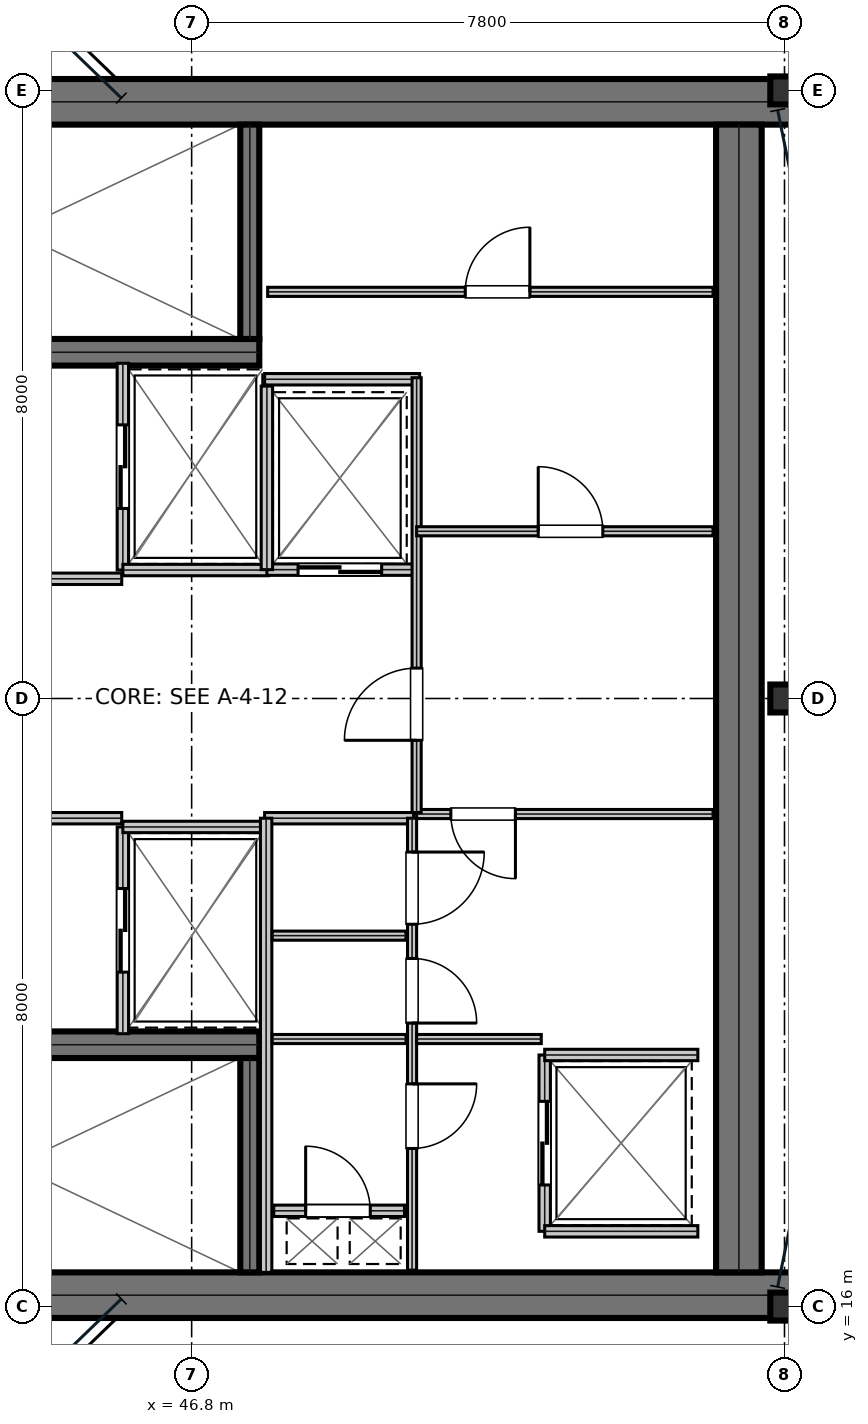
"""IFC4 building model, lengths in metres.
Left out: names, types, materials, properties, quantities, classifications, styles, units other than length and angle.
Written with IfcOpenShell. Run it as: python <this file> out.ifc"""

import sys

from ifc_helpers import new_model, si_unit, direction, frame, frame_2d, origin, origin_2d, place, context, subcontext, project, spatial, rectangle, i_section, extrude, element, fill, save


model = new_model("IFC4")
c1 = context("Model", 3, precision=1e-05, world=origin(), true_north=direction((0.0, 1.0)))
c2 = subcontext(c1, "Body", "Model", "MODEL_VIEW")
j1 = project(units=[si_unit("LENGTHUNIT", "METRE"), si_unit("PLANEANGLEUNIT", "RADIAN")], contexts=[c1])
p1 = place(None, origin())
s1 = spatial("IfcSite", under=j1, at=p1, CompositionType="ELEMENT")
p2 = place(p1, origin())
s2 = spatial("IfcBuilding", under=s1, at=p2, CompositionType="ELEMENT")
p3 = place(p2, frame((0.0, 0.0, 319.5)))
s3 = spatial("IfcBuildingStorey", under=s2, at=p3, CompositionType="ELEMENT", Elevation=319.5)
for number, where, z_axis, x_axis in (
    (1, (38.8, 31.85, 0.0), (0.0, 0.0, 1.0), (1.0, 0.0, 0.0)),
    (2, (38.8, 16.15, 0.0), (0.0, 0.0, 1.0), (1.0, 0.0, 0.0)),
):
    element("IfcWall", number, at=place(p3, frame(where, z_axis=z_axis, x_axis=x_axis)), inside=s3, PredefinedType="SHEAR", context=c2, shape_type="SweptSolid", body=[
        extrude(rectangle(XDim=16.0, YDim=0.6, at=frame_2d((8.0, 0.0))), origin(), (0.0, 0.0, 1.0), 3.81),
    ])
p4 = place(p3, frame((54.0, 16.45, 0.0), z_axis=(0.0, 0.0, 1.0), x_axis=(0.0, 1.0, 0.0)))
e3 = element("IfcWall", 3, at=p4, inside=s3, PredefinedType="SHEAR", context=c2, shape_type="SweptSolid", body=[
    extrude(rectangle(XDim=15.1, YDim=0.6, at=frame_2d((7.55, 0.0))), origin(), (0.0, 0.0, 1.0), 3.81),
])
p5 = place(p3, frame((39.98, 28.555, 0.0), z_axis=(0.0, 0.0, 1.0), x_axis=(1.0, 0.0, 0.0)))
e4 = element("IfcWall", 4, at=p5, inside=s3, PredefinedType="SHEAR", context=c2, shape_type="SweptSolid", body=[
    extrude(rectangle(XDim=7.71, YDim=0.35, at=frame_2d((3.855, 0.0))), origin(), (0.0, 0.0, 1.0), 3.81),
])
p6 = place(p5, frame((0.25, 0.0, 0.0)))
e5 = element("IfcOpeningElement", 5, at=p6, cuts=e4, PredefinedType="OPENING", context=c2, shape_type="SweptSolid", body=[
    extrude(rectangle(XDim=1.1, YDim=2.15, at=frame_2d((0.55, 1.075))), frame((0.0, 0.185, 0.0), z_axis=(0.0, -1.0, 0.0), x_axis=(1.0, 0.0, 0.0)), (0.0, 0.0, 1.0), 0.37),
])
p7 = place(p3, frame((39.98, 19.445, 0.0), z_axis=(0.0, 0.0, 1.0), x_axis=(1.0, 0.0, 0.0)))
e6 = element("IfcWall", 6, at=p7, inside=s3, PredefinedType="SHEAR", context=c2, shape_type="SweptSolid", body=[
    extrude(rectangle(XDim=7.71, YDim=0.35, at=frame_2d((3.855, 0.0))), origin(), (0.0, 0.0, 1.0), 3.81),
])
p8 = place(p7, frame((0.25, 0.0, 0.0)))
e7 = element("IfcOpeningElement", 7, at=p8, cuts=e6, PredefinedType="OPENING", context=c2, shape_type="SweptSolid", body=[
    extrude(rectangle(XDim=1.1, YDim=2.15, at=frame_2d((0.55, 1.075))), frame((0.0, 0.185, 0.0), z_axis=(0.0, -1.0, 0.0), x_axis=(1.0, 0.0, 0.0)), (0.0, 0.0, 1.0), 0.37),
])
for number, where, z_axis, x_axis in (
    (8, (47.565, 28.73, 0.0), (0.0, 0.0, 1.0), (0.0, 1.0, 0.0)),
    (9, (47.565, 16.45, 0.0), (0.0, 0.0, 1.0), (0.0, 1.0, 0.0)),
):
    element("IfcWall", number, at=place(p3, frame(where, z_axis=z_axis, x_axis=x_axis)), inside=s3, PredefinedType="SHEAR", context=c2, shape_type="SweptSolid", body=[
        extrude(rectangle(XDim=2.82, YDim=0.25, at=frame_2d((1.41, 0.0))), origin(), (0.0, 0.0, 1.0), 3.81),
    ])
for number, where, z_axis, x_axis in (
    (10, (54.6, 16.0, 0.0), (0.0, 0.0, 1.0), (1.0, 0.0, 0.0)),
    (11, (54.6, 24.0, 0.0), (0.0, 0.0, 1.0), (1.0, 0.0, 0.0)),
    (12, (54.6, 32.0, 0.0), (0.0, 0.0, 1.0), (1.0, 0.0, 0.0)),
):
    element("IfcColumn", number, at=place(p3, frame(where, z_axis=z_axis, x_axis=x_axis)), inside=s3, PredefinedType="COLUMN", context=c2, shape_type="SweptSolid", body=[
        extrude(i_section(OverallWidth=0.373, OverallDepth=0.368, WebThickness=0.015, FlangeThickness=0.024, at=origin_2d()), origin(), (0.0, 0.0, 1.0), 4.044),
    ])
p9 = place(p3, frame((39.98, 25.575, 0.0), z_axis=(0.0, 0.0, 1.0), x_axis=(1.0, 0.0, 0.0)))
e13 = element("IfcWall", 13, at=p9, inside=s3, PredefinedType="PARTITIONING", context=c2, shape_type="SweptSolid", body=[
    extrude(rectangle(XDim=5.9, YDim=0.15, at=frame_2d((2.95, 0.0))), origin(), (0.0, 0.0, 1.0), 3.81),
])
p10 = place(p9, frame((2.35, 0.0, 0.0)))
e14 = element("IfcOpeningElement", 14, at=p10, cuts=e13, PredefinedType="OPENING", context=c2, shape_type="SweptSolid", body=[
    extrude(rectangle(XDim=1.05, YDim=2.15, at=frame_2d((0.525, 1.075))), frame((0.0, 0.085, 0.0), z_axis=(0.0, -1.0, 0.0), x_axis=(1.0, 0.0, 0.0)), (0.0, 0.0, 1.0), 0.17),
])
p11 = place(p3, frame((39.98, 22.425, 0.0), z_axis=(0.0, 0.0, 1.0), x_axis=(1.0, 0.0, 0.0)))
e15 = element("IfcWall", 15, at=p11, inside=s3, PredefinedType="PARTITIONING", context=c2, shape_type="SweptSolid", body=[
    extrude(rectangle(XDim=5.9, YDim=0.15, at=frame_2d((2.95, 0.0))), origin(), (0.0, 0.0, 1.0), 3.81),
])
p12 = place(p11, frame((2.35, 0.0, 0.0)))
e16 = element("IfcOpeningElement", 16, at=p12, cuts=e15, PredefinedType="OPENING", context=c2, shape_type="SweptSolid", body=[
    extrude(rectangle(XDim=1.05, YDim=2.15, at=frame_2d((0.525, 1.075))), frame((0.0, 0.085, 0.0), z_axis=(0.0, -1.0, 0.0), x_axis=(1.0, 0.0, 0.0)), (0.0, 0.0, 1.0), 0.17),
])
p13 = place(p3, frame((45.895, 25.69, 0.0), z_axis=(0.0, 0.0, 1.0), x_axis=(0.0, 1.0, 0.0)))
e17 = element("IfcWall", 17, at=p13, inside=s3, PredefinedType="PARTITIONING", context=c2, shape_type="SweptSolid", body=[
    extrude(rectangle(XDim=2.72, YDim=0.15, at=frame_2d((1.36, 0.0))), origin(), (0.0, 0.0, 1.0), 3.81),
])
p14 = place(p13, frame((0.81, 0.0, 0.0)))
e18 = element("IfcOpeningElement", 18, at=p14, cuts=e17, PredefinedType="OPENING", context=c2, shape_type="SweptSolid", body=[
    extrude(rectangle(XDim=1.1, YDim=2.15, at=frame_2d((0.55, 1.075))), frame((0.0, 0.085, 0.0), z_axis=(0.0, -1.0, 0.0), x_axis=(1.0, 0.0, 0.0)), (0.0, 0.0, 1.0), 0.17),
])
p15 = place(p3, frame((45.895, 25.69, 0.0), z_axis=(0.0, 0.0, 1.0), x_axis=(1.0, 0.0, 0.0)))
e19 = element("IfcWall", 19, at=p15, inside=s3, PredefinedType="PARTITIONING", context=c2, shape_type="SweptSolid", body=[
    extrude(rectangle(XDim=1.915, YDim=0.15, at=frame_2d((0.958, 0.0))), origin(), (0.0, 0.0, 1.0), 3.81),
])
p16 = place(p3, frame((45.895, 19.59, 0.0), z_axis=(0.0, 0.0, 1.0), x_axis=(0.0, 1.0, 0.0)))
e20 = element("IfcWall", 20, at=p16, inside=s3, PredefinedType="PARTITIONING", context=c2, shape_type="SweptSolid", body=[
    extrude(rectangle(XDim=2.72, YDim=0.15, at=frame_2d((1.36, 0.0))), origin(), (0.0, 0.0, 1.0), 3.81),
])
p17 = place(p16, frame((0.81, 0.0, 0.0)))
e21 = element("IfcOpeningElement", 21, at=p17, cuts=e20, PredefinedType="OPENING", context=c2, shape_type="SweptSolid", body=[
    extrude(rectangle(XDim=1.1, YDim=2.15, at=frame_2d((0.55, 1.075))), frame((0.0, 0.085, 0.0), z_axis=(0.0, -1.0, 0.0), x_axis=(1.0, 0.0, 0.0)), (0.0, 0.0, 1.0), 0.17),
])
p18 = place(p3, frame((45.895, 22.31, 0.0), z_axis=(0.0, 0.0, 1.0), x_axis=(1.0, 0.0, 0.0)))
e22 = element("IfcWall", 22, at=p18, inside=s3, PredefinedType="PARTITIONING", context=c2, shape_type="SweptSolid", body=[
    extrude(rectangle(XDim=1.915, YDim=0.15, at=frame_2d((0.958, 0.0))), origin(), (0.0, 0.0, 1.0), 3.81),
])
p19 = place(p3, frame((47.79, 25.695, 0.0), z_axis=(0.0, 0.0, 1.0), x_axis=(1.0, 0.0, 0.0)))
e23 = element("IfcWall", 23, at=p19, inside=s3, PredefinedType="PARTITIONING", context=c2, shape_type="SweptSolid", body=[
    extrude(rectangle(XDim=1.92, YDim=0.15, at=frame_2d((0.96, 0.0))), origin(), (0.0, 0.0, 1.0), 3.81),
])
p20 = place(p19, frame((0.41, 0.0, 0.0)))
e24 = element("IfcOpeningElement", 24, at=p20, cuts=e23, PredefinedType="OPENING", context=c2, shape_type="SweptSolid", body=[
    extrude(rectangle(XDim=1.1, YDim=2.15, at=frame_2d((0.55, 1.075))), frame((0.0, 0.085, 0.0), z_axis=(0.0, -1.0, 0.0), x_axis=(1.0, 0.0, 0.0)), (0.0, 0.0, 1.0), 0.17),
])
p21 = place(p3, frame((47.79, 25.695, 0.0), z_axis=(0.0, 0.0, 1.0), x_axis=(0.0, 1.0, 0.0)))
e25 = element("IfcWall", 25, at=p21, inside=s3, PredefinedType="PARTITIONING", context=c2, shape_type="SweptSolid", body=[
    extrude(rectangle(XDim=2.415, YDim=0.15, at=frame_2d((1.208, 0.0))), origin(), (0.0, 0.0, 1.0), 3.81),
])
p22 = place(p3, frame((51.445, 16.99, 0.0), z_axis=(0.0, 0.0, 1.0), x_axis=(0.0, 1.0, 0.0)))
e26 = element("IfcWall", 26, at=p22, inside=s3, PredefinedType="PARTITIONING", context=c2, shape_type="SweptSolid", body=[
    extrude(rectangle(XDim=2.32, YDim=0.15, at=frame_2d((1.16, 0.0))), origin(), (0.0, 0.0, 1.0), 3.81),
])
p23 = place(p22, frame((0.61, 0.0, 0.0)))
e27 = element("IfcOpeningElement", 27, at=p23, cuts=e26, PredefinedType="OPENING", context=c2, shape_type="SweptSolid", body=[
    extrude(rectangle(XDim=1.1, YDim=2.15, at=frame_2d((0.55, 1.075))), frame((0.0, 0.085, 0.0), z_axis=(0.0, -1.0, 0.0), x_axis=(1.0, 0.0, 0.0)), (0.0, 0.0, 1.0), 0.17),
])
for number, where, z_axis, x_axis in (
    (28, (51.445, 16.99, 0.0), (0.0, 0.0, 1.0), (1.0, 0.0, 0.0)),
    (29, (51.445, 19.31, 0.0), (0.0, 0.0, 1.0), (1.0, 0.0, 0.0)),
):
    element("IfcWall", number, at=place(p3, frame(where, z_axis=z_axis, x_axis=x_axis)), inside=s3, PredefinedType="PARTITIONING", context=c2, shape_type="SweptSolid", body=[
        extrude(rectangle(XDim=2.015, YDim=0.15, at=frame_2d((1.007, 0.0))), origin(), (0.0, 0.0, 1.0), 3.81),
    ])
p24 = place(p3, frame((47.88, 17.26, 0.0), z_axis=(0.0, 0.0, 1.0), x_axis=(1.0, 0.0, 0.0)))
e30 = element("IfcWall", 30, at=p24, inside=s3, PredefinedType="PARTITIONING", context=c2, shape_type="SweptSolid", body=[
    extrude(rectangle(XDim=1.72, YDim=0.15, at=frame_2d((0.86, 0.0))), origin(), (0.0, 0.0, 1.0), 3.81),
])
p25 = place(p24, frame((0.42, 0.0, 0.0)))
e31 = element("IfcOpeningElement", 31, at=p25, cuts=e30, PredefinedType="OPENING", context=c2, shape_type="SweptSolid", body=[
    extrude(rectangle(XDim=0.85, YDim=2.15, at=frame_2d((0.425, 1.075))), frame((0.0, 0.085, 0.0), z_axis=(0.0, -1.0, 0.0), x_axis=(1.0, 0.0, 0.0)), (0.0, 0.0, 1.0), 0.17),
])
p26 = place(p3, frame((47.76, 22.425, 0.0), z_axis=(0.0, 0.0, 1.0), x_axis=(1.0, 0.0, 0.0)))
e32 = element("IfcWall", 32, at=p26, inside=s3, PredefinedType="PARTITIONING", context=c2, shape_type="SweptSolid", body=[
    extrude(rectangle(XDim=1.96, YDim=0.15, at=frame_2d((0.98, 0.0))), origin(), (0.0, 0.0, 1.0), 3.81),
])
p27 = place(p3, frame((47.78, 16.45, 0.0), z_axis=(0.0, 0.0, 1.0), x_axis=(0.0, 1.0, 0.0)))
e33 = element("IfcWall", 33, at=p27, inside=s3, PredefinedType="PARTITIONING", context=c2, shape_type="SweptSolid", body=[
    extrude(rectangle(XDim=5.975, YDim=0.15, at=frame_2d((2.988, 0.0))), origin(), (0.0, 0.0, 1.0), 3.81),
])
for number, where, z_axis, x_axis in (
    (34, (47.86, 19.52, 0.0), (0.0, 0.0, 1.0), (1.0, 0.0, 0.0)),
    (35, (47.86, 20.88, 0.0), (0.0, 0.0, 1.0), (1.0, 0.0, 0.0)),
):
    element("IfcWall", number, at=place(p3, frame(where, z_axis=z_axis, x_axis=x_axis)), inside=s3, PredefinedType="PARTITIONING", context=c2, shape_type="SweptSolid", body=[
        extrude(rectangle(XDim=1.76, YDim=0.12, at=frame_2d((0.88, 0.0))), origin(), (0.0, 0.0, 1.0), 3.81),
    ])
p28 = place(p3, frame((49.7, 16.48, 0.0), z_axis=(0.0, 0.0, 1.0), x_axis=(0.0, 1.0, 0.0)))
e36 = element("IfcWall", 36, at=p28, inside=s3, PredefinedType="PARTITIONING", context=c2, shape_type="SweptSolid", body=[
    extrude(rectangle(XDim=5.945, YDim=0.12, at=frame_2d((2.973, 0.0))), origin(), (0.0, 0.0, 1.0), 3.81),
])
p29 = place(p28, frame((1.6, 0.0, 0.0)))
e37 = element("IfcOpeningElement", 37, at=p29, cuts=e36, PredefinedType="OPENING", context=c2, shape_type="SweptSolid", body=[
    extrude(rectangle(XDim=0.85, YDim=2.15, at=frame_2d((0.425, 1.075))), frame((0.0, 0.07, 0.0), z_axis=(0.0, -1.0, 0.0), x_axis=(1.0, 0.0, 0.0)), (0.0, 0.0, 1.0), 0.14),
])
p30 = place(p28, frame((3.25, 0.0, 0.0)))
e38 = element("IfcOpeningElement", 38, at=p30, cuts=e36, PredefinedType="OPENING", context=c2, shape_type="SweptSolid", body=[
    extrude(rectangle(XDim=0.85, YDim=2.15, at=frame_2d((0.425, 1.075))), frame((0.0, 0.07, 0.0), z_axis=(0.0, -1.0, 0.0), x_axis=(1.0, 0.0, 0.0)), (0.0, 0.0, 1.0), 0.14),
])
p31 = place(p28, frame((4.55, 0.0, 0.0)))
e39 = element("IfcOpeningElement", 39, at=p31, cuts=e36, PredefinedType="OPENING", context=c2, shape_type="SweptSolid", body=[
    extrude(rectangle(XDim=0.95, YDim=2.15, at=frame_2d((0.475, 1.075))), frame((0.0, 0.07, 0.0), z_axis=(0.0, -1.0, 0.0), x_axis=(1.0, 0.0, 0.0)), (0.0, 0.0, 1.0), 0.14),
])
p32 = place(p3, frame((49.76, 22.48, 0.0), z_axis=(0.0, 0.0, 1.0), x_axis=(1.0, 0.0, 0.0)))
e40 = element("IfcWall", 40, at=p32, inside=s3, PredefinedType="PARTITIONING", context=c2, shape_type="SweptSolid", body=[
    extrude(rectangle(XDim=3.9, YDim=0.12, at=frame_2d((1.95, 0.0))), origin(), (0.0, 0.0, 1.0), 3.81),
])
p33 = place(p32, frame((0.45, 0.0, 0.0)))
e41 = element("IfcOpeningElement", 41, at=p33, cuts=e40, PredefinedType="OPENING", context=c2, shape_type="SweptSolid", body=[
    extrude(rectangle(XDim=0.85, YDim=2.15, at=frame_2d((0.425, 1.075))), frame((0.0, 0.07, 0.0), z_axis=(0.0, -1.0, 0.0), x_axis=(1.0, 0.0, 0.0)), (0.0, 0.0, 1.0), 0.14),
])
p34 = place(p3, frame((49.76, 19.52, 0.0), z_axis=(0.0, 0.0, 1.0), x_axis=(1.0, 0.0, 0.0)))
e42 = element("IfcWall", 42, at=p34, inside=s3, PredefinedType="PARTITIONING", context=c2, shape_type="SweptSolid", body=[
    extrude(rectangle(XDim=1.64, YDim=0.12, at=frame_2d((0.82, 0.0))), origin(), (0.0, 0.0, 1.0), 3.81),
])
p35 = place(p3, frame((47.76, 28.2, 0.0), z_axis=(0.0, 0.0, 1.0), x_axis=(1.0, 0.0, 0.0)))
e43 = element("IfcWall", 43, at=p35, inside=s3, PredefinedType="PARTITIONING", context=c2, shape_type="SweptSolid", body=[
    extrude(rectangle(XDim=2.04, YDim=0.15, at=frame_2d((1.02, 0.0))), origin(), (0.0, 0.0, 1.0), 3.81),
])
p36 = place(p3, frame((49.76, 22.5, 0.0), z_axis=(0.0, 0.0, 1.0), x_axis=(0.0, 1.0, 0.0)))
e44 = element("IfcWall", 44, at=p36, inside=s3, PredefinedType="PARTITIONING", context=c2, shape_type="SweptSolid", body=[
    extrude(rectangle(XDim=5.72, YDim=0.12, at=frame_2d((2.86, 0.0))), origin(), (0.0, 0.0, 1.0), 3.81),
])
p37 = place(p36, frame((0.95, 0.0, 0.0)))
e45 = element("IfcOpeningElement", 45, at=p37, cuts=e44, PredefinedType="OPENING", context=c2, shape_type="SweptSolid", body=[
    extrude(rectangle(XDim=0.95, YDim=2.15, at=frame_2d((0.475, 1.075))), frame((0.0, 0.07, 0.0), z_axis=(0.0, -1.0, 0.0), x_axis=(1.0, 0.0, 0.0)), (0.0, 0.0, 1.0), 0.14),
])
p38 = place(p3, frame((49.76, 26.2, 0.0), z_axis=(0.0, 0.0, 1.0), x_axis=(1.0, 0.0, 0.0)))
e46 = element("IfcWall", 46, at=p38, inside=s3, PredefinedType="PARTITIONING", context=c2, shape_type="SweptSolid", body=[
    extrude(rectangle(XDim=3.9, YDim=0.12, at=frame_2d((1.95, 0.0))), origin(), (0.0, 0.0, 1.0), 3.81),
])
p39 = place(p38, frame((1.6, 0.0, 0.0)))
e47 = element("IfcOpeningElement", 47, at=p39, cuts=e46, PredefinedType="OPENING", context=c2, shape_type="SweptSolid", body=[
    extrude(rectangle(XDim=0.85, YDim=2.15, at=frame_2d((0.425, 1.075))), frame((0.0, 0.07, 0.0), z_axis=(0.0, -1.0, 0.0), x_axis=(1.0, 0.0, 0.0)), (0.0, 0.0, 1.0), 0.14),
])
p40 = place(p3, frame((47.8, 29.35, 0.0), z_axis=(0.0, 0.0, 1.0), x_axis=(1.0, 0.0, 0.0)))
e48 = element("IfcWall", 48, at=p40, inside=s3, PredefinedType="PARTITIONING", context=c2, shape_type="SweptSolid", body=[
    extrude(rectangle(XDim=5.86, YDim=0.12, at=frame_2d((2.93, 0.0))), origin(), (0.0, 0.0, 1.0), 3.81),
])
p41 = place(p40, frame((2.6, 0.0, 0.0)))
e49 = element("IfcOpeningElement", 49, at=p41, cuts=e48, PredefinedType="OPENING", context=c2, shape_type="SweptSolid", body=[
    extrude(rectangle(XDim=0.85, YDim=2.15, at=frame_2d((0.425, 1.075))), frame((0.0, 0.07, 0.0), z_axis=(0.0, -1.0, 0.0), x_axis=(1.0, 0.0, 0.0)), (0.0, 0.0, 1.0), 0.14),
])
p42 = place(p14, frame((1.1, 0.0, 0.0), z_axis=(0.0, 0.0, 1.0), x_axis=(-1.0, 0.0, 0.0)))
e50 = element("IfcDoor", 50, at=p42, inside=s3, OperationType="DOUBLE_DOOR_SLIDING", PredefinedType="DOOR", context=c2, shape_type="SweptSolid", body=[
    extrude(rectangle(XDim=1.1, YDim=2.15, at=frame_2d((0.55, 1.075))), frame((0.0, 0.025, 0.0), z_axis=(0.0, -1.0, 0.0), x_axis=(1.0, 0.0, 0.0)), (0.0, 0.0, 1.0), 0.05),
])
fill(e18, e50)
p43 = place(p17, frame((1.1, 0.0, 0.0), z_axis=(0.0, 0.0, 1.0), x_axis=(-1.0, 0.0, 0.0)))
e51 = element("IfcDoor", 51, at=p43, inside=s3, OperationType="DOUBLE_DOOR_SLIDING", PredefinedType="DOOR", context=c2, shape_type="SweptSolid", body=[
    extrude(rectangle(XDim=1.1, YDim=2.15, at=frame_2d((0.55, 1.075))), frame((0.0, 0.025, 0.0), z_axis=(0.0, -1.0, 0.0), x_axis=(1.0, 0.0, 0.0)), (0.0, 0.0, 1.0), 0.05),
])
fill(e21, e51)
p44 = place(p20, frame((1.1, 0.0, 0.0), z_axis=(0.0, 0.0, 1.0), x_axis=(-1.0, 0.0, 0.0)))
e52 = element("IfcDoor", 52, at=p44, inside=s3, OperationType="DOUBLE_DOOR_SLIDING", PredefinedType="DOOR", context=c2, shape_type="SweptSolid", body=[
    extrude(rectangle(XDim=1.1, YDim=2.15, at=frame_2d((0.55, 1.075))), frame((0.0, 0.025, 0.0), z_axis=(0.0, -1.0, 0.0), x_axis=(1.0, 0.0, 0.0)), (0.0, 0.0, 1.0), 0.05),
])
fill(e24, e52)
p45 = place(p23, frame((1.1, 0.0, 0.0), z_axis=(0.0, 0.0, 1.0), x_axis=(-1.0, 0.0, 0.0)))
e53 = element("IfcDoor", 53, at=p45, inside=s3, OperationType="DOUBLE_DOOR_SLIDING", PredefinedType="DOOR", context=c2, shape_type="SweptSolid", body=[
    extrude(rectangle(XDim=1.1, YDim=2.15, at=frame_2d((0.55, 1.075))), frame((0.0, 0.025, 0.0), z_axis=(0.0, -1.0, 0.0), x_axis=(1.0, 0.0, 0.0)), (0.0, 0.0, 1.0), 0.05),
])
fill(e27, e53)
p46 = place(p25, origin())
e54 = element("IfcDoor", 54, at=p46, inside=s3, OperationType="SINGLE_SWING_LEFT", PredefinedType="TRAPDOOR", context=c2, shape_type="SweptSolid", body=[
    extrude(rectangle(XDim=0.85, YDim=2.15, at=frame_2d((0.425, 1.075))), frame((0.0, 0.025, 0.0), z_axis=(0.0, -1.0, 0.0), x_axis=(1.0, 0.0, 0.0)), (0.0, 0.0, 1.0), 0.05),
])
fill(e31, e54)
p47 = place(p29, frame((0.85, 0.0, 0.0), z_axis=(0.0, 0.0, 1.0), x_axis=(-1.0, 0.0, 0.0)))
e55 = element("IfcDoor", 55, at=p47, inside=s3, OperationType="SINGLE_SWING_LEFT", PredefinedType="DOOR", context=c2, shape_type="SweptSolid", body=[
    extrude(rectangle(XDim=0.85, YDim=2.15, at=frame_2d((0.425, 1.075))), frame((0.0, 0.025, 0.0), z_axis=(0.0, -1.0, 0.0), x_axis=(1.0, 0.0, 0.0)), (0.0, 0.0, 1.0), 0.05),
])
fill(e37, e55)
p48 = place(p30, frame((0.85, 0.0, 0.0), z_axis=(0.0, 0.0, 1.0), x_axis=(-1.0, 0.0, 0.0)))
e56 = element("IfcDoor", 56, at=p48, inside=s3, OperationType="SINGLE_SWING_RIGHT", PredefinedType="DOOR", context=c2, shape_type="SweptSolid", body=[
    extrude(rectangle(XDim=0.85, YDim=2.15, at=frame_2d((0.425, 1.075))), frame((0.0, 0.025, 0.0), z_axis=(0.0, -1.0, 0.0), x_axis=(1.0, 0.0, 0.0)), (0.0, 0.0, 1.0), 0.05),
])
fill(e38, e56)
p49 = place(p31, frame((0.95, 0.0, 0.0), z_axis=(0.0, 0.0, 1.0), x_axis=(-1.0, 0.0, 0.0)))
e57 = element("IfcDoor", 57, at=p49, inside=s3, OperationType="SINGLE_SWING_LEFT", PredefinedType="DOOR", context=c2, shape_type="SweptSolid", body=[
    extrude(rectangle(XDim=0.95, YDim=2.15, at=frame_2d((0.475, 1.075))), frame((0.0, 0.025, 0.0), z_axis=(0.0, -1.0, 0.0), x_axis=(1.0, 0.0, 0.0)), (0.0, 0.0, 1.0), 0.05),
])
fill(e39, e57)
p50 = place(p33, frame((0.85, 0.0, 0.0), z_axis=(0.0, 0.0, 1.0), x_axis=(-1.0, 0.0, 0.0)))
e58 = element("IfcDoor", 58, at=p50, inside=s3, OperationType="SINGLE_SWING_LEFT", PredefinedType="DOOR", context=c2, shape_type="SweptSolid", body=[
    extrude(rectangle(XDim=0.85, YDim=2.15, at=frame_2d((0.425, 1.075))), frame((0.0, 0.025, 0.0), z_axis=(0.0, -1.0, 0.0), x_axis=(1.0, 0.0, 0.0)), (0.0, 0.0, 1.0), 0.05),
])
fill(e41, e58)
p51 = place(p37, origin())
e59 = element("IfcDoor", 59, at=p51, inside=s3, OperationType="SINGLE_SWING_LEFT", PredefinedType="DOOR", context=c2, shape_type="SweptSolid", body=[
    extrude(rectangle(XDim=0.95, YDim=2.15, at=frame_2d((0.475, 1.075))), frame((0.0, 0.025, 0.0), z_axis=(0.0, -1.0, 0.0), x_axis=(1.0, 0.0, 0.0)), (0.0, 0.0, 1.0), 0.05),
])
fill(e45, e59)
p52 = place(p39, origin())
e60 = element("IfcDoor", 60, at=p52, inside=s3, OperationType="SINGLE_SWING_LEFT", PredefinedType="DOOR", context=c2, shape_type="SweptSolid", body=[
    extrude(rectangle(XDim=0.85, YDim=2.15, at=frame_2d((0.425, 1.075))), frame((0.0, 0.025, 0.0), z_axis=(0.0, -1.0, 0.0), x_axis=(1.0, 0.0, 0.0)), (0.0, 0.0, 1.0), 0.05),
])
fill(e47, e60)
p53 = place(p41, origin())
e61 = element("IfcDoor", 61, at=p53, inside=s3, OperationType="SINGLE_SWING_RIGHT", PredefinedType="DOOR", context=c2, shape_type="SweptSolid", body=[
    extrude(rectangle(XDim=0.85, YDim=2.15, at=frame_2d((0.425, 1.075))), frame((0.0, 0.025, 0.0), z_axis=(0.0, -1.0, 0.0), x_axis=(1.0, 0.0, 0.0)), (0.0, 0.0, 1.0), 0.05),
])
fill(e49, e61)
save(model, sys.argv[1])
